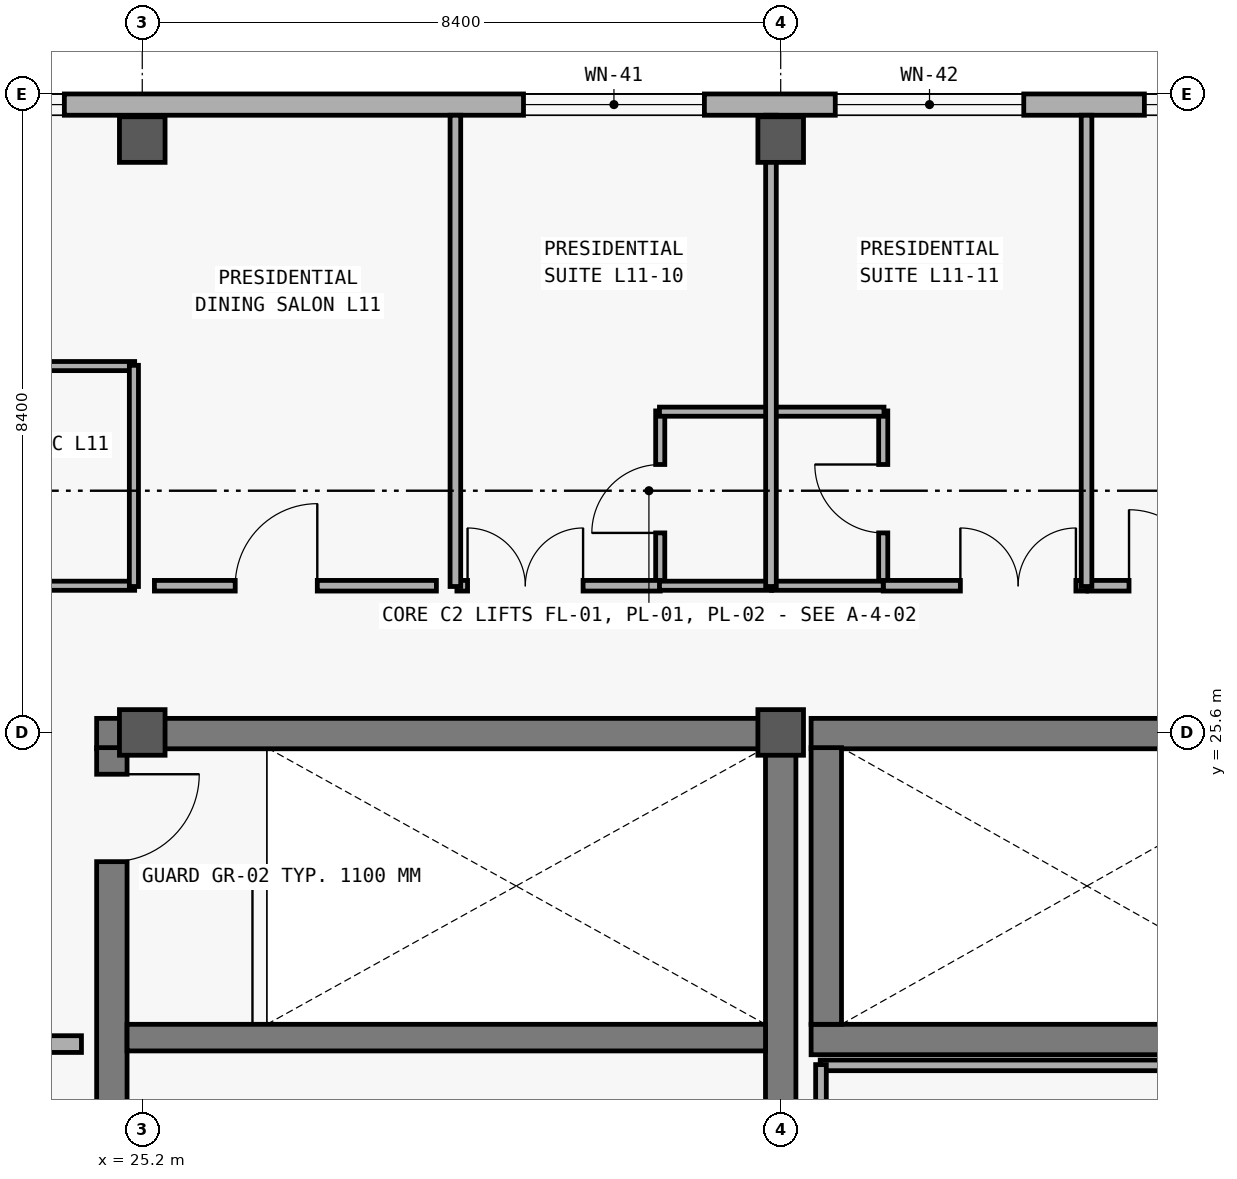
"""IFC4 building model, lengths in metres.
Left out: names, types, materials, properties, quantities, classifications, styles, units other than length and angle.
Written with IfcOpenShell. Run it as: python <this file> out.ifc"""

import sys

from ifc_helpers import new_model, si_unit, direction, frame, frame_2d, origin, origin_2d, place, context, subcontext, project, spatial, rectangle, extrude, element, fill, save


model = new_model("IFC4")
c1 = context("Model", 3, precision=1e-05, world=origin(), true_north=direction((0.0, 1.0)))
c2 = subcontext(c1, "Body", "Model", "MODEL_VIEW")
j1 = project(units=[si_unit("LENGTHUNIT", "METRE"), si_unit("PLANEANGLEUNIT", "RADIAN")], contexts=[c1])
p1 = place(None, origin())
s1 = spatial("IfcSite", under=j1, at=p1, CompositionType="ELEMENT")
p2 = place(p1, origin())
s2 = spatial("IfcBuilding", under=s1, at=p2, CompositionType="ELEMENT")
p3 = place(p2, frame((0.0, 0.0, 44.4)))
s3 = spatial("IfcBuildingStorey", under=s2, at=p3, CompositionType="ELEMENT", Elevation=44.4)
for number, where, z_axis, x_axis in (
    (1, (25.2, 25.6, 0.0), (0.0, 0.0, 1.0), (1.0, 0.0, 0.0)),
    (2, (25.2, 33.4, 0.0), (0.0, 0.0, 1.0), (1.0, 0.0, 0.0)),
    (3, (33.6, 25.6, 0.0), (0.0, 0.0, 1.0), (1.0, 0.0, 0.0)),
    (4, (33.6, 33.4, 0.0), (0.0, 0.0, 1.0), (1.0, 0.0, 0.0)),
):
    element("IfcColumn", number, at=place(p3, frame(where, z_axis=z_axis, x_axis=x_axis)), inside=s3, PredefinedType="COLUMN", context=c2, shape_type="SweptSolid", body=[
        extrude(rectangle(XDim=0.6, YDim=0.6, at=origin_2d()), origin(), (0.0, 0.0, 1.0), 4.2),
    ])
p4 = place(p3, frame((17.08, 33.86, 0.0), z_axis=(0.0, 0.0, 1.0), x_axis=(1.0, 0.0, 0.0)))
e5 = element("IfcWall", 5, at=p4, inside=s3, PredefinedType="SOLIDWALL", context=c2, shape_type="SweptSolid", body=[
    extrude(rectangle(XDim=49.84, YDim=0.28, at=frame_2d((24.92, 0.0))), origin(), (0.0, 0.0, 1.0), 3.96),
])
p5 = place(p4, frame((5.295, 0.0, 0.85)))
e6 = element("IfcOpeningElement", 6, at=p5, cuts=e5, PredefinedType="OPENING", context=c2, shape_type="SweptSolid", body=[
    extrude(rectangle(XDim=1.8, YDim=1.6, at=frame_2d((0.9, 0.8))), frame((0.0, 0.15, 0.0), z_axis=(0.0, -1.0, 0.0), x_axis=(1.0, 0.0, 0.0)), (0.0, 0.0, 1.0), 0.3),
])
p6 = place(p4, frame((13.136, 0.0, 0.85)))
e7 = element("IfcOpeningElement", 7, at=p6, cuts=e5, PredefinedType="OPENING", context=c2, shape_type="SweptSolid", body=[
    extrude(rectangle(XDim=2.38, YDim=1.95, at=frame_2d((1.19, 0.975))), frame((0.0, 0.15, 0.0), z_axis=(0.0, -1.0, 0.0), x_axis=(1.0, 0.0, 0.0)), (0.0, 0.0, 1.0), 0.3),
])
p7 = place(p4, frame((17.238, 0.0, 0.85)))
e8 = element("IfcOpeningElement", 8, at=p7, cuts=e5, PredefinedType="OPENING", context=c2, shape_type="SweptSolid", body=[
    extrude(rectangle(XDim=2.48, YDim=2.0, at=frame_2d((1.24, 1.0))), frame((0.0, 0.15, 0.0), z_axis=(0.0, -1.0, 0.0), x_axis=(1.0, 0.0, 0.0)), (0.0, 0.0, 1.0), 0.3),
])
p8 = place(p4, frame((21.305, 0.0, 0.85)))
e9 = element("IfcOpeningElement", 9, at=p8, cuts=e5, PredefinedType="OPENING", context=c2, shape_type="SweptSolid", body=[
    extrude(rectangle(XDim=2.65, YDim=2.0, at=frame_2d((1.325, 1.0))), frame((0.0, 0.15, 0.0), z_axis=(0.0, -1.0, 0.0), x_axis=(1.0, 0.0, 0.0)), (0.0, 0.0, 1.0), 0.3),
])
p9 = place(p4, frame((25.308, 0.0, 0.85)))
e10 = element("IfcOpeningElement", 10, at=p9, cuts=e5, PredefinedType="OPENING", context=c2, shape_type="SweptSolid", body=[
    extrude(rectangle(XDim=2.95, YDim=2.05, at=frame_2d((1.475, 1.025))), frame((0.0, 0.15, 0.0), z_axis=(0.0, -1.0, 0.0), x_axis=(1.0, 0.0, 0.0)), (0.0, 0.0, 1.0), 0.3),
])
p10 = place(p4, frame((30.035, 0.0, 0.85)))
e11 = element("IfcOpeningElement", 11, at=p10, cuts=e5, PredefinedType="OPENING", context=c2, shape_type="SweptSolid", body=[
    extrude(rectangle(XDim=1.8, YDim=1.8, at=frame_2d((0.9, 0.9))), frame((0.0, 0.15, 0.0), z_axis=(0.0, -1.0, 0.0), x_axis=(1.0, 0.0, 0.0)), (0.0, 0.0, 1.0), 0.3),
])
p11 = place(p4, frame((34.037, 0.0, 0.85)))
e12 = element("IfcOpeningElement", 12, at=p11, cuts=e5, PredefinedType="OPENING", context=c2, shape_type="SweptSolid", body=[
    extrude(rectangle(XDim=2.1, YDim=1.8, at=frame_2d((1.05, 0.9))), frame((0.0, 0.15, 0.0), z_axis=(0.0, -1.0, 0.0), x_axis=(1.0, 0.0, 0.0)), (0.0, 0.0, 1.0), 0.3),
])
p12 = place(p4, frame((38.04, 0.0, 0.85)))
e13 = element("IfcOpeningElement", 13, at=p12, cuts=e5, PredefinedType="OPENING", context=c2, shape_type="SweptSolid", body=[
    extrude(rectangle(XDim=2.4, YDim=1.8, at=frame_2d((1.2, 0.9))), frame((0.0, 0.15, 0.0), z_axis=(0.0, -1.0, 0.0), x_axis=(1.0, 0.0, 0.0)), (0.0, 0.0, 1.0), 0.3),
])
p13 = place(p4, frame((42.042, 0.0, 0.85)))
e14 = element("IfcOpeningElement", 14, at=p13, cuts=e5, PredefinedType="OPENING", context=c2, shape_type="SweptSolid", body=[
    extrude(rectangle(XDim=2.7, YDim=1.85, at=frame_2d((1.35, 0.925))), frame((0.0, 0.15, 0.0), z_axis=(0.0, -1.0, 0.0), x_axis=(1.0, 0.0, 0.0)), (0.0, 0.0, 1.0), 0.3),
])
p14 = place(p4, frame((46.044, 0.0, 0.85)))
e15 = element("IfcOpeningElement", 15, at=p14, cuts=e5, PredefinedType="OPENING", context=c2, shape_type="SweptSolid", body=[
    extrude(rectangle(XDim=3.0, YDim=1.9, at=frame_2d((1.5, 0.95))), frame((0.0, 0.15, 0.0), z_axis=(0.0, -1.0, 0.0), x_axis=(1.0, 0.0, 0.0)), (0.0, 0.0, 1.0), 0.3),
])
p15 = place(p3, frame((33.8, 25.585, 0.0), z_axis=(0.0, 0.0, 1.0), x_axis=(-1.0, 0.0, 0.0)))
e16 = element("IfcWall", 16, at=p15, inside=s3, PredefinedType="SHEAR", context=c2, shape_type="SweptSolid", body=[
    extrude(rectangle(XDim=9.2, YDim=0.4, at=frame_2d((4.6, 0.0))), origin(), (0.0, 0.0, 1.0), 3.96),
])
p16 = place(p3, frame((24.8, 25.4, 0.0), z_axis=(0.0, 0.0, 1.0), x_axis=(0.0, -1.0, 0.0)))
e17 = element("IfcWall", 17, at=p16, inside=s3, PredefinedType="SHEAR", context=c2, shape_type="SweptSolid", body=[
    extrude(rectangle(XDim=7.4, YDim=0.4, at=frame_2d((3.7, 0.0))), origin(), (0.0, 0.0, 1.0), 3.96),
])
p17 = place(p16, frame((0.35, 0.0, 0.0)))
e18 = element("IfcOpeningElement", 18, at=p17, cuts=e17, PredefinedType="OPENING", context=c2, shape_type="SweptSolid", body=[
    extrude(rectangle(XDim=1.15, YDim=2.2, at=frame_2d((0.575, 1.1))), frame((0.0, 0.21, 0.0), z_axis=(0.0, -1.0, 0.0), x_axis=(1.0, 0.0, 0.0)), (0.0, 0.0, 1.0), 0.42),
])
p18 = place(p3, frame((33.6, 18.0, 0.0), z_axis=(0.0, 0.0, 1.0), x_axis=(0.0, 1.0, 0.0)))
e19 = element("IfcWall", 19, at=p18, inside=s3, PredefinedType="SHEAR", context=c2, shape_type="SweptSolid", body=[
    extrude(rectangle(XDim=7.4, YDim=0.4, at=frame_2d((3.7, 0.0))), origin(), (0.0, 0.0, 1.0), 3.96),
])
p19 = place(p3, frame((25.0, 21.585, 0.0), z_axis=(0.0, 0.0, 1.0), x_axis=(1.0, 0.0, 0.0)))
e20 = element("IfcWall", 20, at=p19, inside=s3, PredefinedType="SHEAR", context=c2, shape_type="SweptSolid", body=[
    extrude(rectangle(XDim=8.4, YDim=0.35, at=frame_2d((4.2, 0.0))), origin(), (0.0, 0.0, 1.0), 3.96),
])
p20 = place(p3, frame((19.6, 21.5, 0.0), z_axis=(0.0, 0.0, 1.0), x_axis=(1.0, 0.0, 0.0)))
e21 = element("IfcWall", 21, at=p20, inside=s3, PredefinedType="SOLIDWALL", context=c2, shape_type="SweptSolid", body=[
    extrude(rectangle(XDim=4.8, YDim=0.22, at=frame_2d((2.4, 0.0))), origin(), (0.0, 0.0, 1.0), 3.11),
])
p21 = place(p20, frame((2.05, 0.0, 0.0)))
e22 = element("IfcOpeningElement", 22, at=p21, cuts=e21, PredefinedType="OPENING", context=c2, shape_type="SweptSolid", body=[
    extrude(rectangle(XDim=1.25, YDim=2.2, at=frame_2d((0.625, 1.1))), frame((0.0, 0.12, 0.0), z_axis=(0.0, -1.0, 0.0), x_axis=(1.0, 0.0, 0.0)), (0.0, 0.0, 1.0), 0.24),
])
for number, where, z_axis, x_axis in (
    (23, (34.0, 21.56, 0.0), (0.0, 0.0, 1.0), (1.0, 0.0, 0.0)),
    (24, (43.1, 25.585, 0.0), (0.0, 0.0, 1.0), (-1.0, 0.0, 0.0)),
):
    element("IfcWall", number, at=place(p3, frame(where, z_axis=z_axis, x_axis=x_axis)), inside=s3, PredefinedType="SHEAR", context=c2, shape_type="SweptSolid", body=[
        extrude(rectangle(XDim=9.1, YDim=0.4, at=frame_2d((4.55, 0.0))), origin(), (0.0, 0.0, 1.0), 3.96),
    ])
p22 = place(p3, frame((34.2, 25.4, 0.0), z_axis=(0.0, 0.0, 1.0), x_axis=(0.0, -1.0, 0.0)))
e25 = element("IfcWall", 25, at=p22, inside=s3, PredefinedType="SHEAR", context=c2, shape_type="SweptSolid", body=[
    extrude(rectangle(XDim=3.64, YDim=0.4, at=frame_2d((1.82, 0.0))), origin(), (0.0, 0.0, 1.0), 3.96),
])
p23 = place(p3, frame((32.015, 27.52, 0.0), z_axis=(0.0, 0.0, 1.0), x_axis=(0.0, 1.0, 0.0)))
e26 = element("IfcWall", 26, at=p23, inside=s3, PredefinedType="PARTITIONING", context=c2, shape_type="SweptSolid", body=[
    extrude(rectangle(XDim=2.31, YDim=0.12, at=frame_2d((1.155, 0.0))), origin(), (0.0, 0.0, 1.0), 3.06),
])
p24 = place(p23, frame((0.705, 0.0, 0.0)))
e27 = element("IfcOpeningElement", 27, at=p24, cuts=e26, PredefinedType="OPENING", context=c2, shape_type="SweptSolid", body=[
    extrude(rectangle(XDim=0.9, YDim=2.18, at=frame_2d((0.45, 1.09))), frame((0.0, 0.07, 0.0), z_axis=(0.0, -1.0, 0.0), x_axis=(1.0, 0.0, 0.0)), (0.0, 0.0, 1.0), 0.14),
])
p25 = place(p3, frame((34.949, 27.52, 0.0), z_axis=(0.0, 0.0, 1.0), x_axis=(0.0, 1.0, 0.0)))
e28 = element("IfcWall", 28, at=p25, inside=s3, PredefinedType="PARTITIONING", context=c2, shape_type="SweptSolid", body=[
    extrude(rectangle(XDim=2.31, YDim=0.12, at=frame_2d((1.155, 0.0))), origin(), (0.0, 0.0, 1.0), 3.06),
])
p26 = place(p25, frame((0.705, 0.0, 0.0)))
e29 = element("IfcOpeningElement", 29, at=p26, cuts=e28, PredefinedType="OPENING", context=c2, shape_type="SweptSolid", body=[
    extrude(rectangle(XDim=0.9, YDim=2.18, at=frame_2d((0.45, 1.09))), frame((0.0, 0.07, 0.0), z_axis=(0.0, -1.0, 0.0), x_axis=(1.0, 0.0, 0.0)), (0.0, 0.0, 1.0), 0.14),
])
p27 = place(p3, frame((22.44, 27.53, 0.0), z_axis=(0.0, 0.0, 1.0), x_axis=(1.0, 0.0, 0.0)))
e30 = element("IfcWall", 30, at=p27, inside=s3, PredefinedType="PARTITIONING", context=c2, shape_type="SweptSolid", body=[
    extrude(rectangle(XDim=2.66, YDim=0.12, at=frame_2d((1.33, 0.0))), origin(), (0.0, 0.0, 1.0), 3.06),
])
p28 = place(p27, frame((0.561, 0.0, 0.0)))
e31 = element("IfcOpeningElement", 31, at=p28, cuts=e30, PredefinedType="OPENING", context=c2, shape_type="SweptSolid", body=[
    extrude(rectangle(XDim=0.92, YDim=2.15, at=frame_2d((0.46, 1.075))), frame((0.0, 0.07, 0.0), z_axis=(0.0, -1.0, 0.0), x_axis=(1.0, 0.0, 0.0)), (0.0, 0.0, 1.0), 0.14),
])
p29 = place(p3, frame((25.36, 27.53, 0.0), z_axis=(0.0, 0.0, 1.0), x_axis=(1.0, 0.0, 0.0)))
e32 = element("IfcWall", 32, at=p29, inside=s3, PredefinedType="PARTITIONING", context=c2, shape_type="SweptSolid", body=[
    extrude(rectangle(XDim=3.71, YDim=0.14, at=frame_2d((1.855, 0.0))), origin(), (0.0, 0.0, 1.0), 3.06),
])
p30 = place(p29, frame((1.063, 0.0, 0.0)))
e33 = element("IfcOpeningElement", 33, at=p30, cuts=e32, PredefinedType="OPENING", context=c2, shape_type="SweptSolid", body=[
    extrude(rectangle(XDim=1.08, YDim=2.25, at=frame_2d((0.54, 1.125))), frame((0.0, 0.08, 0.0), z_axis=(0.0, -1.0, 0.0), x_axis=(1.0, 0.0, 0.0)), (0.0, 0.0, 1.0), 0.16),
])
p31 = place(p3, frame((29.34, 27.53, 0.0), z_axis=(0.0, 0.0, 1.0), x_axis=(1.0, 0.0, 0.0)))
e34 = element("IfcWall", 34, at=p31, inside=s3, PredefinedType="PARTITIONING", context=c2, shape_type="SweptSolid", body=[
    extrude(rectangle(XDim=2.675, YDim=0.14, at=frame_2d((1.337, 0.0))), origin(), (0.0, 0.0, 1.0), 3.06),
])
p32 = place(p31, frame((0.14, 0.0, 0.0)))
e35 = element("IfcOpeningElement", 35, at=p32, cuts=e34, PredefinedType="OPENING", context=c2, shape_type="SweptSolid", body=[
    extrude(rectangle(XDim=1.52, YDim=2.35, at=frame_2d((0.76, 1.175))), frame((0.0, 0.08, 0.0), z_axis=(0.0, -1.0, 0.0), x_axis=(1.0, 0.0, 0.0)), (0.0, 0.0, 1.0), 0.16),
])
p33 = place(p3, frame((34.949, 27.53, 0.0), z_axis=(0.0, 0.0, 1.0), x_axis=(1.0, 0.0, 0.0)))
e36 = element("IfcWall", 36, at=p33, inside=s3, PredefinedType="PARTITIONING", context=c2, shape_type="SweptSolid", body=[
    extrude(rectangle(XDim=2.675, YDim=0.14, at=frame_2d((1.337, 0.0))), origin(), (0.0, 0.0, 1.0), 3.06),
])
p34 = place(p33, frame((1.015, 0.0, 0.0)))
e37 = element("IfcOpeningElement", 37, at=p34, cuts=e36, PredefinedType="OPENING", context=c2, shape_type="SweptSolid", body=[
    extrude(rectangle(XDim=1.52, YDim=2.35, at=frame_2d((0.76, 1.175))), frame((0.0, 0.08, 0.0), z_axis=(0.0, -1.0, 0.0), x_axis=(1.0, 0.0, 0.0)), (0.0, 0.0, 1.0), 0.16),
])
p35 = place(p3, frame((37.644, 27.53, 0.0), z_axis=(0.0, 0.0, 1.0), x_axis=(1.0, 0.0, 0.0)))
e38 = element("IfcWall", 38, at=p35, inside=s3, PredefinedType="PARTITIONING", context=c2, shape_type="SweptSolid", body=[
    extrude(rectangle(XDim=2.675, YDim=0.14, at=frame_2d((1.337, 0.0))), origin(), (0.0, 0.0, 1.0), 3.06),
])
p36 = place(p35, frame((0.539, 0.0, 0.0)))
e39 = element("IfcOpeningElement", 39, at=p36, cuts=e38, PredefinedType="OPENING", context=c2, shape_type="SweptSolid", body=[
    extrude(rectangle(XDim=1.0, YDim=2.28, at=frame_2d((0.5, 1.14))), frame((0.0, 0.08, 0.0), z_axis=(0.0, -1.0, 0.0), x_axis=(1.0, 0.0, 0.0)), (0.0, 0.0, 1.0), 0.16),
])
for number, where, z_axis, x_axis in (
    (40, (32.005, 27.53, 0.0), (0.0, 0.0, 1.0), (1.0, 0.0, 0.0)),
    (41, (32.005, 29.82, 0.0), (0.0, 0.0, 1.0), (1.0, 0.0, 0.0)),
):
    element("IfcWall", number, at=place(p3, frame(where, z_axis=z_axis, x_axis=x_axis)), inside=s3, PredefinedType="PARTITIONING", context=c2, shape_type="SweptSolid", body=[
        extrude(rectangle(XDim=1.477, YDim=0.12, at=frame_2d((0.739, 0.0))), origin(), (0.0, 0.0, 1.0), 3.06),
    ])
p37 = place(p3, frame((33.482, 27.53, 0.0), z_axis=(0.0, 0.0, 1.0), x_axis=(1.0, 0.0, 0.0)))
e42 = element("IfcWall", 42, at=p37, inside=s3, PredefinedType="PARTITIONING", context=c2, shape_type="SweptSolid", body=[
    extrude(rectangle(XDim=1.467, YDim=0.12, at=frame_2d((0.733, 0.0))), origin(), (0.0, 0.0, 1.0), 3.06),
])
p38 = place(p3, frame((33.482, 29.82, 0.0), z_axis=(0.0, 0.0, 1.0), x_axis=(1.0, 0.0, 0.0)))
e43 = element("IfcWall", 43, at=p38, inside=s3, PredefinedType="PARTITIONING", context=c2, shape_type="SweptSolid", body=[
    extrude(rectangle(XDim=1.477, YDim=0.12, at=frame_2d((0.739, 0.0))), origin(), (0.0, 0.0, 1.0), 3.06),
])
p39 = place(p3, frame((22.44, 30.42, 0.0), z_axis=(0.0, 0.0, 1.0), x_axis=(1.0, 0.0, 0.0)))
e44 = element("IfcWall", 44, at=p39, inside=s3, PredefinedType="PARTITIONING", context=c2, shape_type="SweptSolid", body=[
    extrude(rectangle(XDim=2.66, YDim=0.12, at=frame_2d((1.33, 0.0))), origin(), (0.0, 0.0, 1.0), 3.06),
])
p40 = place(p3, frame((25.09, 27.52, 0.0), z_axis=(0.0, 0.0, 1.0), x_axis=(0.0, 1.0, 0.0)))
e45 = element("IfcWall", 45, at=p40, inside=s3, PredefinedType="PARTITIONING", context=c2, shape_type="SweptSolid", body=[
    extrude(rectangle(XDim=2.91, YDim=0.12, at=frame_2d((1.455, 0.0))), origin(), (0.0, 0.0, 1.0), 3.06),
])
p41 = place(p3, frame((34.12, 21.22, 0.0), z_axis=(0.0, 0.0, 1.0), x_axis=(1.0, 0.0, 0.0)))
e46 = element("IfcWall", 46, at=p41, inside=s3, PredefinedType="PARTITIONING", context=c2, shape_type="SweptSolid", body=[
    extrude(rectangle(XDim=10.76, YDim=0.14, at=frame_2d((5.38, 0.0))), origin(), (0.0, 0.0, 1.0), 3.06),
])
p42 = place(p3, frame((34.13, 17.77, 0.0), z_axis=(0.0, 0.0, 1.0), x_axis=(0.0, 1.0, 0.0)))
e47 = element("IfcWall", 47, at=p42, inside=s3, PredefinedType="PARTITIONING", context=c2, shape_type="SweptSolid", body=[
    extrude(rectangle(XDim=3.46, YDim=0.14, at=frame_2d((1.73, 0.0))), origin(), (0.0, 0.0, 1.0), 3.06),
])
for number, where, z_axis, x_axis in (
    (48, (29.32, 27.52, 0.0), (0.0, 0.0, 1.0), (0.0, 1.0, 0.0)),
    (49, (33.472, 27.52, 0.0), (0.0, 0.0, 1.0), (0.0, 1.0, 0.0)),
    (50, (37.624, 27.52, 0.0), (0.0, 0.0, 1.0), (0.0, 1.0, 0.0)),
):
    element("IfcWall", number, at=place(p3, frame(where, z_axis=z_axis, x_axis=x_axis)), inside=s3, PredefinedType="PARTITIONING", context=c2, shape_type="SweptSolid", body=[
        extrude(rectangle(XDim=6.2, YDim=0.14, at=frame_2d((3.1, 0.0))), origin(), (0.0, 0.0, 1.0), 3.06),
    ])
p43 = place(p5, origin())
e51 = element("IfcWindow", 51, at=p43, inside=s3, PartitioningType="SINGLE_PANEL", PredefinedType="WINDOW", context=c2, shape_type="SweptSolid", body=[
    extrude(rectangle(XDim=1.8, YDim=1.6, at=frame_2d((0.9, 0.8))), frame((0.0, 0.03, 0.0), z_axis=(0.0, -1.0, 0.0), x_axis=(1.0, 0.0, 0.0)), (0.0, 0.0, 1.0), 0.06),
])
fill(e6, e51)
p44 = place(p6, origin())
e52 = element("IfcWindow", 52, at=p44, inside=s3, PartitioningType="SINGLE_PANEL", PredefinedType="WINDOW", context=c2, shape_type="SweptSolid", body=[
    extrude(rectangle(XDim=2.38, YDim=1.95, at=frame_2d((1.19, 0.975))), frame((0.0, 0.03, 0.0), z_axis=(0.0, -1.0, 0.0), x_axis=(1.0, 0.0, 0.0)), (0.0, 0.0, 1.0), 0.06),
])
fill(e7, e52)
p45 = place(p7, origin())
e53 = element("IfcWindow", 53, at=p45, inside=s3, PartitioningType="SINGLE_PANEL", PredefinedType="WINDOW", context=c2, shape_type="SweptSolid", body=[
    extrude(rectangle(XDim=2.48, YDim=2.0, at=frame_2d((1.24, 1.0))), frame((0.0, 0.03, 0.0), z_axis=(0.0, -1.0, 0.0), x_axis=(1.0, 0.0, 0.0)), (0.0, 0.0, 1.0), 0.06),
])
fill(e8, e53)
p46 = place(p8, origin())
e54 = element("IfcWindow", 54, at=p46, inside=s3, PartitioningType="SINGLE_PANEL", PredefinedType="WINDOW", context=c2, shape_type="SweptSolid", body=[
    extrude(rectangle(XDim=2.65, YDim=2.0, at=frame_2d((1.325, 1.0))), frame((0.0, 0.03, 0.0), z_axis=(0.0, -1.0, 0.0), x_axis=(1.0, 0.0, 0.0)), (0.0, 0.0, 1.0), 0.06),
])
fill(e9, e54)
p47 = place(p17, origin())
e55 = element("IfcDoor", 55, at=p47, inside=s3, OperationType="SINGLE_SWING_LEFT", PredefinedType="DOOR", context=c2, shape_type="SweptSolid", body=[
    extrude(rectangle(XDim=1.15, YDim=2.2, at=frame_2d((0.575, 1.1))), frame((0.0, 0.025, 0.0), z_axis=(0.0, -1.0, 0.0), x_axis=(1.0, 0.0, 0.0)), (0.0, 0.0, 1.0), 0.05),
])
fill(e18, e55)
p48 = place(p24, origin())
e56 = element("IfcDoor", 56, at=p48, inside=s3, OperationType="SINGLE_SWING_LEFT", PredefinedType="DOOR", context=c2, shape_type="SweptSolid", body=[
    extrude(rectangle(XDim=0.9, YDim=2.18, at=frame_2d((0.45, 1.09))), frame((0.0, 0.025, 0.0), z_axis=(0.0, -1.0, 0.0), x_axis=(1.0, 0.0, 0.0)), (0.0, 0.0, 1.0), 0.05),
])
fill(e27, e56)
p49 = place(p26, origin())
e57 = element("IfcDoor", 57, at=p49, inside=s3, OperationType="SINGLE_SWING_RIGHT", PredefinedType="DOOR", context=c2, shape_type="SweptSolid", body=[
    extrude(rectangle(XDim=0.9, YDim=2.18, at=frame_2d((0.45, 1.09))), frame((0.0, 0.025, 0.0), z_axis=(0.0, -1.0, 0.0), x_axis=(1.0, 0.0, 0.0)), (0.0, 0.0, 1.0), 0.05),
])
fill(e29, e57)
p50 = place(p30, origin())
e58 = element("IfcDoor", 58, at=p50, inside=s3, OperationType="SINGLE_SWING_RIGHT", PredefinedType="DOOR", context=c2, shape_type="SweptSolid", body=[
    extrude(rectangle(XDim=1.08, YDim=2.25, at=frame_2d((0.54, 1.125))), frame((0.0, 0.025, 0.0), z_axis=(0.0, -1.0, 0.0), x_axis=(1.0, 0.0, 0.0)), (0.0, 0.0, 1.0), 0.05),
])
fill(e33, e58)
p51 = place(p32, origin())
e59 = element("IfcDoor", 59, at=p51, inside=s3, OperationType="DOUBLE_DOOR_SINGLE_SWING", PredefinedType="DOOR", context=c2, shape_type="SweptSolid", body=[
    extrude(rectangle(XDim=1.52, YDim=2.35, at=frame_2d((0.76, 1.175))), frame((0.0, 0.025, 0.0), z_axis=(0.0, -1.0, 0.0), x_axis=(1.0, 0.0, 0.0)), (0.0, 0.0, 1.0), 0.05),
])
fill(e35, e59)
p52 = place(p34, origin())
e60 = element("IfcDoor", 60, at=p52, inside=s3, OperationType="DOUBLE_DOOR_SINGLE_SWING", PredefinedType="DOOR", context=c2, shape_type="SweptSolid", body=[
    extrude(rectangle(XDim=1.52, YDim=2.35, at=frame_2d((0.76, 1.175))), frame((0.0, 0.025, 0.0), z_axis=(0.0, -1.0, 0.0), x_axis=(1.0, 0.0, 0.0)), (0.0, 0.0, 1.0), 0.05),
])
fill(e37, e60)
p53 = place(p36, origin())
e61 = element("IfcDoor", 61, at=p53, inside=s3, OperationType="SINGLE_SWING_LEFT", PredefinedType="DOOR", context=c2, shape_type="SweptSolid", body=[
    extrude(rectangle(XDim=1.0, YDim=2.28, at=frame_2d((0.5, 1.14))), frame((0.0, 0.025, 0.0), z_axis=(0.0, -1.0, 0.0), x_axis=(1.0, 0.0, 0.0)), (0.0, 0.0, 1.0), 0.05),
])
fill(e39, e61)
save(model, sys.argv[1])
